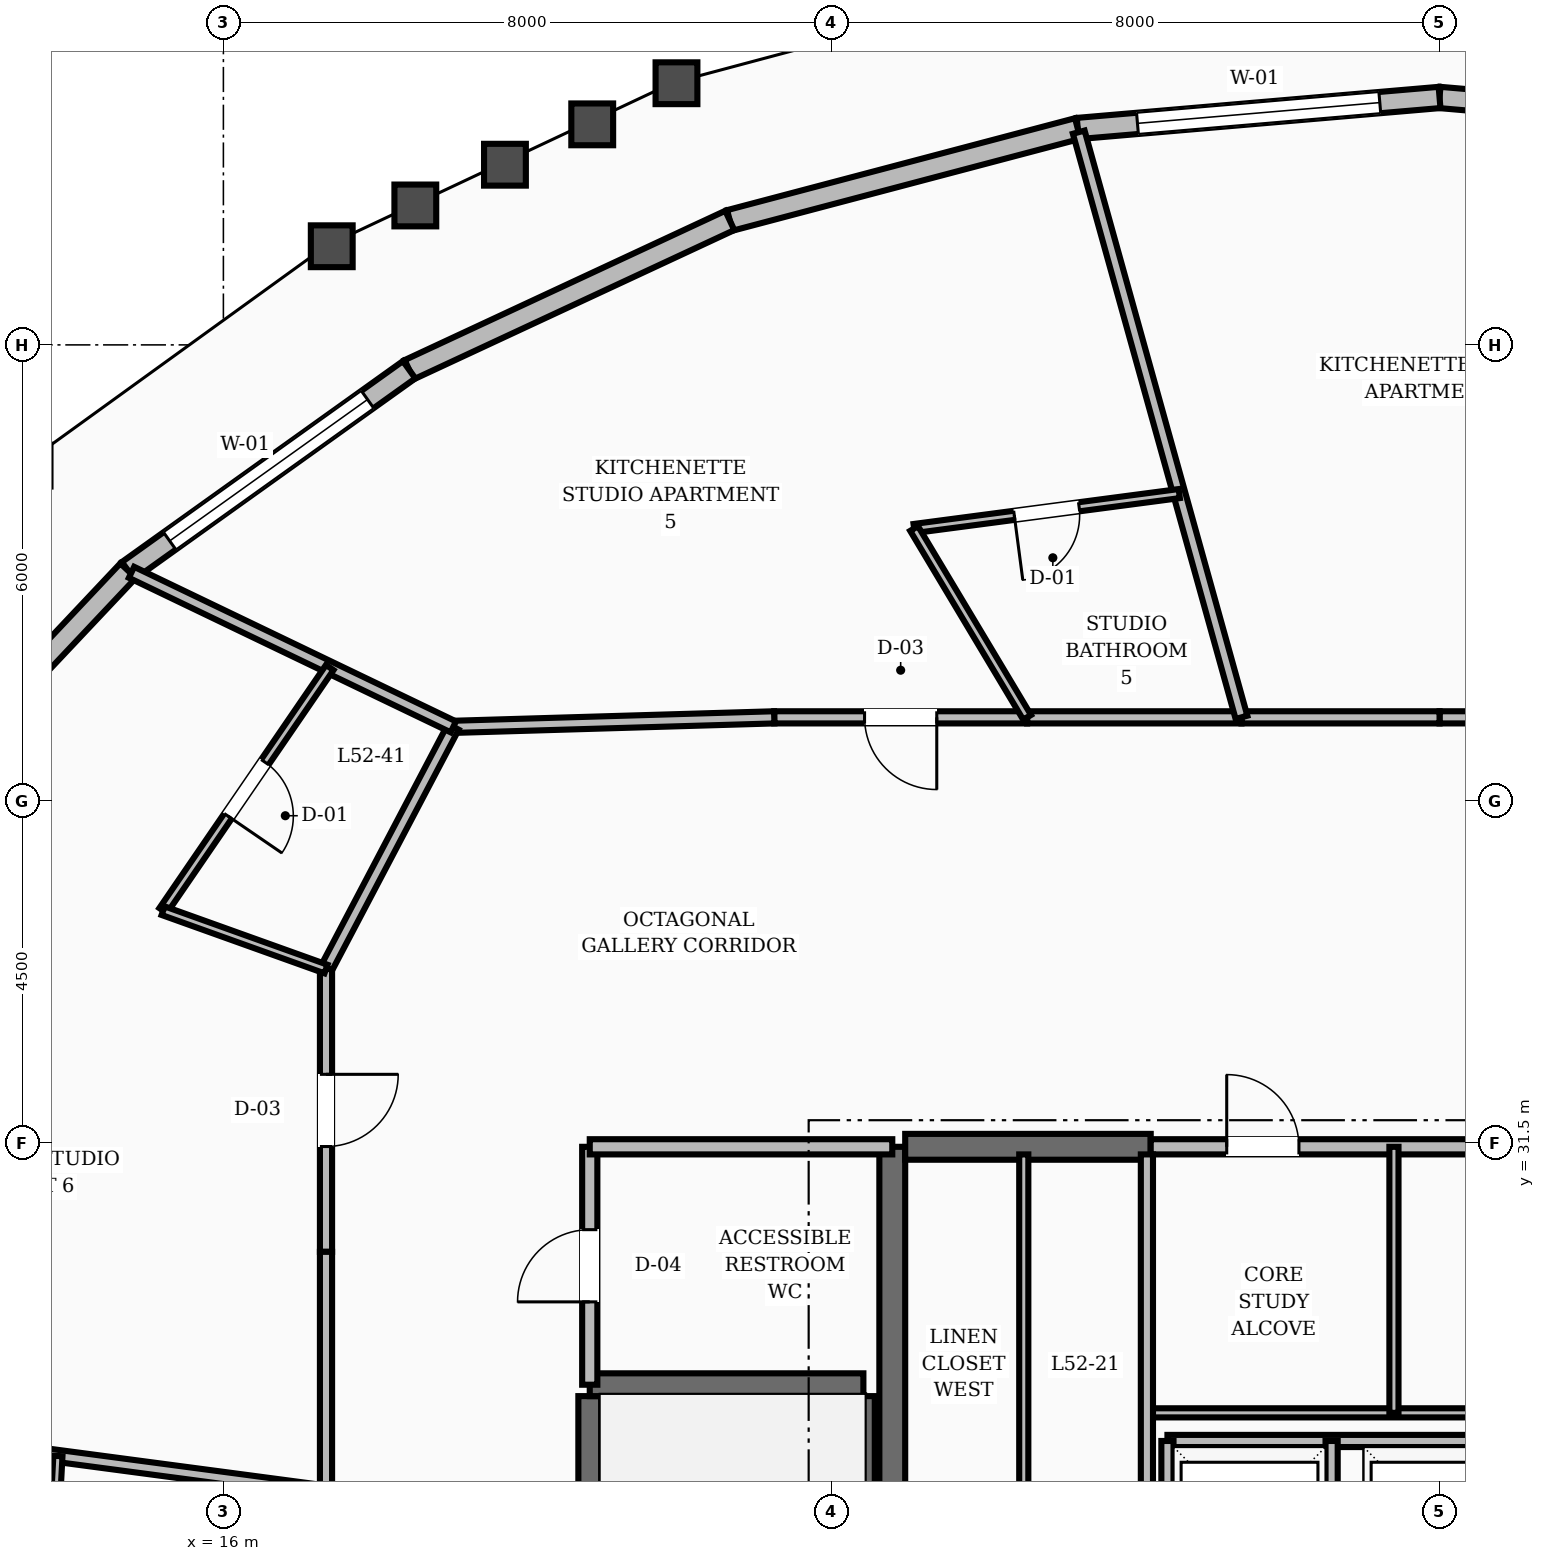
"""IFC4 building model, lengths in metres.
Left out: names, types, materials, properties, quantities, classifications, styles, units other than length and angle.
Written with IfcOpenShell. Run it as: python <this file> out.ifc"""

import sys

from ifc_helpers import new_model, si_unit, direction, frame, frame_2d, origin, place, context, subcontext, project, spatial, rectangle, extrude, element, fill, save


model = new_model("IFC4")
c1 = context("Model", 3, precision=1e-05, world=origin(), true_north=direction((0.0, 1.0)))
c2 = subcontext(c1, "Body", "Model", "MODEL_VIEW")
j1 = project(units=[si_unit("LENGTHUNIT", "METRE"), si_unit("PLANEANGLEUNIT", "RADIAN")], contexts=[c1])
p1 = place(None, origin())
s1 = spatial("IfcSite", under=j1, at=p1, CompositionType="ELEMENT")
p2 = place(p1, origin())
s2 = spatial("IfcBuilding", under=s1, at=p2, CompositionType="ELEMENT")
p3 = place(p2, frame((0.0, 0.0, 200.0)))
s3 = spatial("IfcBuildingStorey", under=s2, at=p3, CompositionType="ELEMENT", Elevation=200.0)
p4 = place(p3, frame((24.8, 25.15, 0.0), z_axis=(0.0, 0.0, 1.0), x_axis=(0.0, 1.0, 0.0)))
e1 = element("IfcWall", 1, at=p4, inside=s3, PredefinedType="SHEAR", context=c2, shape_type="SweptSolid", body=[
    extrude(rectangle(XDim=6.3, YDim=0.34, at=frame_2d((3.15, 0.0))), origin(), (0.0, 0.0, 1.0), 3.6),
])
p5 = place(p3, frame((24.97, 31.45, 0.0), z_axis=(0.0, 0.0, 1.0), x_axis=(1.0, 0.0, 0.0)))
e2 = element("IfcWall", 2, at=p5, inside=s3, PredefinedType="SHEAR", context=c2, shape_type="SweptSolid", body=[
    extrude(rectangle(XDim=3.23, YDim=0.34, at=frame_2d((1.615, 0.0))), origin(), (0.0, 0.0, 1.0), 3.6),
])
for number, where, z_axis, x_axis in (
    (3, (20.82, 19.43, 0.0), (0.0, 0.0, 1.0), (0.0, 1.0, 0.0)),
    (4, (24.42, 19.43, 0.0), (0.0, 0.0, 1.0), (0.0, 1.0, 0.0)),
):
    element("IfcWall", number, at=place(p3, frame(where, z_axis=z_axis, x_axis=x_axis)), inside=s3, PredefinedType="SHEAR", context=c2, shape_type="SweptSolid", body=[
        extrude(rectangle(XDim=8.74, YDim=0.3, at=frame_2d((4.37, 0.0))), origin(), (0.0, 0.0, 1.0), 3.6),
    ])
p6 = place(p3, frame((20.82, 28.32, 0.0), z_axis=(0.0, 0.0, 1.0), x_axis=(1.0, 0.0, 0.0)))
e5 = element("IfcWall", 5, at=p6, inside=s3, PredefinedType="SHEAR", context=c2, shape_type="SweptSolid", body=[
    extrude(rectangle(XDim=3.6, YDim=0.3, at=frame_2d((1.8, 0.0))), origin(), (0.0, 0.0, 1.0), 3.6),
])
p7 = place(p3, frame((36.76, 44.847, 0.0), z_axis=(0.0, 0.0, 1.0), x_axis=(-0.996339067147, 0.085489550689, 0.0)))
e6 = element("IfcWall", 6, at=p7, inside=s3, PredefinedType="STANDARD", context=c2, shape_type="SweptSolid", body=[
    extrude(rectangle(XDim=4.778, YDim=0.28, at=frame_2d((2.389, 0.0))), origin(), (0.0, 0.0, 1.0), 2.77),
])
p8 = place(p3, frame((32.0, 45.255, 0.0), z_axis=(0.0, 0.0, 1.0), x_axis=(-0.996339067147, -0.085489550689, 0.0)))
e7 = element("IfcWall", 7, at=p8, inside=s3, PredefinedType="STANDARD", context=c2, shape_type="SweptSolid", body=[
    extrude(rectangle(XDim=4.778, YDim=0.28, at=frame_2d((2.389, 0.0))), origin(), (0.0, 0.0, 1.0), 2.77),
])
p9 = place(p8, frame((0.789, 0.0, 0.8)))
e8 = element("IfcOpeningElement", 8, at=p9, cuts=e7, PredefinedType="OPENING", context=c2, shape_type="SweptSolid", body=[
    extrude(rectangle(XDim=3.2, YDim=1.65, at=frame_2d((1.6, 0.825))), frame((0.0, 0.15, 0.0), z_axis=(0.0, -1.0, 0.0), x_axis=(1.0, 0.0, 0.0)), (0.0, 0.0, 1.0), 0.3),
])
p10 = place(p3, frame((27.24, 44.847, 0.0), z_axis=(0.0, 0.0, 1.0), x_axis=(-0.966819561224, -0.255460243549, 0.0)))
e9 = element("IfcWall", 9, at=p10, inside=s3, PredefinedType="STANDARD", context=c2, shape_type="SweptSolid", body=[
    extrude(rectangle(XDim=4.734, YDim=0.28, at=frame_2d((2.367, 0.0))), origin(), (0.0, 0.0, 1.0), 2.77),
])
p11 = place(p3, frame((22.662, 43.637, 0.0), z_axis=(0.0, 0.0, 1.0), x_axis=(-0.906555409807, -0.422086826315, 0.0)))
e10 = element("IfcWall", 10, at=p11, inside=s3, PredefinedType="STANDARD", context=c2, shape_type="SweptSolid", body=[
    extrude(rectangle(XDim=4.653, YDim=0.28, at=frame_2d((2.327, 0.0))), origin(), (0.0, 0.0, 1.0), 2.77),
])
p12 = place(p3, frame((18.444, 41.673, 0.0), z_axis=(0.0, 0.0, 1.0), x_axis=(-0.813519294528, -0.581537924327, 0.0)))
e11 = element("IfcWall", 11, at=p12, inside=s3, PredefinedType="STANDARD", context=c2, shape_type="SweptSolid", body=[
    extrude(rectangle(XDim=4.545, YDim=0.28, at=frame_2d((2.273, 0.0))), origin(), (0.0, 0.0, 1.0), 2.77),
])
p13 = place(p12, frame((0.673, 0.0, 0.8)))
e12 = element("IfcOpeningElement", 12, at=p13, cuts=e11, PredefinedType="OPENING", context=c2, shape_type="SweptSolid", body=[
    extrude(rectangle(XDim=3.2, YDim=1.65, at=frame_2d((1.6, 0.825))), frame((0.0, 0.15, 0.0), z_axis=(0.0, -1.0, 0.0), x_axis=(1.0, 0.0, 0.0)), (0.0, 0.0, 1.0), 0.3),
])
p14 = place(p3, frame((14.746, 39.03, 0.0), z_axis=(0.0, 0.0, 1.0), x_axis=(-0.685717407763, -0.727867870352, 0.0)))
e13 = element("IfcWall", 13, at=p14, inside=s3, PredefinedType="STANDARD", context=c2, shape_type="SweptSolid", body=[
    extrude(rectangle(XDim=4.425, YDim=0.28, at=frame_2d((2.213, 0.0))), origin(), (0.0, 0.0, 1.0), 2.77),
])
p15 = place(p3, frame((20.82, 28.32, 0.0), z_axis=(0.0, 0.0, 1.0), x_axis=(0.0, 1.0, 0.0)))
e14 = element("IfcWall", 14, at=p15, inside=s3, PredefinedType="SOLIDWALL", context=c2, shape_type="SweptSolid", body=[
    extrude(rectangle(XDim=3.13, YDim=0.2, at=frame_2d((1.565, 0.0))), origin(), (0.0, 0.0, 1.0), 2.75),
])
p16 = place(p15, frame((1.09, 0.0, 0.0)))
e15 = element("IfcOpeningElement", 15, at=p16, cuts=e14, PredefinedType="OPENING", context=c2, shape_type="SweptSolid", body=[
    extrude(rectangle(XDim=0.95, YDim=2.1, at=frame_2d((0.475, 1.05))), frame((0.0, 0.11, 0.0), z_axis=(0.0, -1.0, 0.0), x_axis=(1.0, 0.0, 0.0)), (0.0, 0.0, 1.0), 0.22),
])
p17 = place(p3, frame((20.82, 31.45, 0.0), z_axis=(0.0, 0.0, 1.0), x_axis=(1.0, 0.0, 0.0)))
e16 = element("IfcWall", 16, at=p17, inside=s3, PredefinedType="SOLIDWALL", context=c2, shape_type="SweptSolid", body=[
    extrude(rectangle(XDim=3.98, YDim=0.2, at=frame_2d((1.99, 0.0))), origin(), (0.0, 0.0, 1.0), 2.75),
])
p18 = place(p3, frame((28.42, 27.58, 0.0), z_axis=(0.0, 0.0, 1.0), x_axis=(1.0, 0.0, 0.0)))
e17 = element("IfcWall", 17, at=p18, inside=s3, PredefinedType="SOLIDWALL", context=c2, shape_type="SweptSolid", body=[
    extrude(rectangle(XDim=4.66, YDim=0.16, at=frame_2d((2.33, 0.0))), origin(), (0.0, 0.0, 1.0), 2.75),
])
for number, where, z_axis, x_axis in (
    (18, (28.42, 25.42, 0.0), (0.0, 0.0, 1.0), (0.0, 1.0, 0.0)),
    (19, (30.58, 25.42, 0.0), (0.0, 0.0, 1.0), (0.0, 1.0, 0.0)),
):
    element("IfcWall", number, at=place(p3, frame(where, z_axis=z_axis, x_axis=x_axis)), inside=s3, PredefinedType="SOLIDWALL", context=c2, shape_type="SweptSolid", body=[
        extrude(rectangle(XDim=2.16, YDim=0.16, at=frame_2d((1.08, 0.0))), origin(), (0.0, 0.0, 1.0), 2.75),
    ])
p19 = place(p3, frame((28.2, 31.45, 0.0), z_axis=(0.0, 0.0, 1.0), x_axis=(1.0, 0.0, 0.0)))
e20 = element("IfcWall", 20, at=p19, inside=s3, PredefinedType="SOLIDWALL", context=c2, shape_type="SweptSolid", body=[
    extrude(rectangle(XDim=7.6, YDim=0.2, at=frame_2d((3.8, 0.0))), origin(), (0.0, 0.0, 1.0), 2.75),
])
p20 = place(p19, frame((1.0, 0.0, 0.0)))
e21 = element("IfcOpeningElement", 21, at=p20, cuts=e20, PredefinedType="OPENING", context=c2, shape_type="SweptSolid", body=[
    extrude(rectangle(XDim=0.95, YDim=2.1, at=frame_2d((0.475, 1.05))), frame((0.0, 0.11, 0.0), z_axis=(0.0, -1.0, 0.0), x_axis=(1.0, 0.0, 0.0)), (0.0, 0.0, 1.0), 0.22),
])
p21 = place(p3, frame((28.2, 27.95, 0.0), z_axis=(0.0, 0.0, 1.0), x_axis=(1.0, 0.0, 0.0)))
e22 = element("IfcWall", 22, at=p21, inside=s3, PredefinedType="PARTITIONING", context=c2, shape_type="SweptSolid", body=[
    extrude(rectangle(XDim=7.6, YDim=0.12, at=frame_2d((3.8, 0.0))), origin(), (0.0, 0.0, 1.0), 2.75),
])
p22 = place(p3, frame((31.4, 27.95, 0.0), z_axis=(0.0, 0.0, 1.0), x_axis=(0.0, 1.0, 0.0)))
e23 = element("IfcWall", 23, at=p22, inside=s3, PredefinedType="PARTITIONING", context=c2, shape_type="SweptSolid", body=[
    extrude(rectangle(XDim=3.5, YDim=0.12, at=frame_2d((1.75, 0.0))), origin(), (0.0, 0.0, 1.0), 2.75),
])
p23 = place(p3, frame((28.15, 25.25, 0.0), z_axis=(0.0, 0.0, 1.0), x_axis=(0.0, 1.0, 0.0)))
e24 = element("IfcWall", 24, at=p23, inside=s3, PredefinedType="SOLIDWALL", context=c2, shape_type="SweptSolid", body=[
    extrude(rectangle(XDim=6.1, YDim=0.16, at=frame_2d((3.05, 0.0))), origin(), (0.0, 0.0, 1.0), 2.75),
])
p24 = place(p3, frame((26.53, 25.25, 0.0), z_axis=(0.0, 0.0, 1.0), x_axis=(0.0, 1.0, 0.0)))
e25 = element("IfcWall", 25, at=p24, inside=s3, PredefinedType="PARTITIONING", context=c2, shape_type="SweptSolid", body=[
    extrude(rectangle(XDim=6.1, YDim=0.12, at=frame_2d((3.05, 0.0))), origin(), (0.0, 0.0, 1.0), 2.75),
])
p25 = place(p3, frame((34.606, 37.1, 0.0), z_axis=(0.0, 0.0, 1.0), x_axis=(-1.0, 0.0, 0.0)))
e26 = element("IfcWall", 26, at=p25, inside=s3, PredefinedType="SOLIDWALL", context=c2, shape_type="SweptSolid", body=[
    extrude(rectangle(XDim=2.606, YDim=0.16, at=frame_2d((1.303, 0.0))), origin(), (0.0, 0.0, 1.0), 2.75),
])
p26 = place(p25, frame((0.828, 0.0, 0.0)))
e27 = element("IfcOpeningElement", 27, at=p26, cuts=e26, PredefinedType="OPENING", context=c2, shape_type="SweptSolid", body=[
    extrude(rectangle(XDim=0.95, YDim=2.1, at=frame_2d((0.475, 1.05))), frame((0.0, 0.09, 0.0), z_axis=(0.0, -1.0, 0.0), x_axis=(1.0, 0.0, 0.0)), (0.0, 0.0, 1.0), 0.18),
])
p27 = place(p3, frame((32.0, 37.1, 0.0), z_axis=(0.0, 0.0, 1.0), x_axis=(-1.0, 0.0, 0.0)))
e28 = element("IfcWall", 28, at=p27, inside=s3, PredefinedType="SOLIDWALL", context=c2, shape_type="SweptSolid", body=[
    extrude(rectangle(XDim=2.606, YDim=0.16, at=frame_2d((1.303, 0.0))), origin(), (0.0, 0.0, 1.0), 2.75),
])
p28 = place(p3, frame((29.394, 37.1, 0.0), z_axis=(0.0, 0.0, 1.0), x_axis=(-1.0, 0.0, 0.0)))
e29 = element("IfcWall", 29, at=p28, inside=s3, PredefinedType="SOLIDWALL", context=c2, shape_type="SweptSolid", body=[
    extrude(rectangle(XDim=2.821, YDim=0.16, at=frame_2d((1.41, 0.0))), origin(), (0.0, 0.0, 1.0), 2.75),
])
p29 = place(p3, frame((26.574, 37.1, 0.0), z_axis=(0.0, 0.0, 1.0), x_axis=(-1.0, 0.0, 0.0)))
e30 = element("IfcWall", 30, at=p29, inside=s3, PredefinedType="SOLIDWALL", context=c2, shape_type="SweptSolid", body=[
    extrude(rectangle(XDim=3.327, YDim=0.16, at=frame_2d((1.664, 0.0))), origin(), (0.0, 0.0, 1.0), 2.75),
])
p30 = place(p29, frame((1.188, 0.0, 0.0)))
e31 = element("IfcOpeningElement", 31, at=p30, cuts=e30, PredefinedType="OPENING", context=c2, shape_type="SweptSolid", body=[
    extrude(rectangle(XDim=0.95, YDim=2.1, at=frame_2d((0.475, 1.05))), frame((0.0, 0.09, 0.0), z_axis=(0.0, -1.0, 0.0), x_axis=(1.0, 0.0, 0.0)), (0.0, 0.0, 1.0), 0.18),
])
p31 = place(p3, frame((23.247, 37.1, 0.0), z_axis=(0.0, 0.0, 1.0), x_axis=(-0.999561990195, -0.029594387265, 0.0)))
e32 = element("IfcWall", 32, at=p31, inside=s3, PredefinedType="SOLIDWALL", context=c2, shape_type="SweptSolid", body=[
    extrude(rectangle(XDim=4.224, YDim=0.16, at=frame_2d((2.112, 0.0))), origin(), (0.0, 0.0, 1.0), 2.75),
])
p32 = place(p3, frame((19.025, 36.975, 0.0), z_axis=(0.0, 0.0, 1.0), x_axis=(-0.46527115782, -0.885168204185, 0.0)))
e33 = element("IfcWall", 33, at=p32, inside=s3, PredefinedType="SOLIDWALL", context=c2, shape_type="SweptSolid", body=[
    extrude(rectangle(XDim=3.6, YDim=0.16, at=frame_2d((1.8, 0.0))), origin(), (0.0, 0.0, 1.0), 2.75),
])
p33 = place(p3, frame((17.35, 33.789, 0.0), z_axis=(0.0, 0.0, 1.0), x_axis=(0.0, -1.0, 0.0)))
e34 = element("IfcWall", 34, at=p33, inside=s3, PredefinedType="SOLIDWALL", context=c2, shape_type="SweptSolid", body=[
    extrude(rectangle(XDim=3.721, YDim=0.16, at=frame_2d((1.86, 0.0))), origin(), (0.0, 0.0, 1.0), 2.75),
])
p34 = place(p33, frame((1.385, 0.0, 0.0)))
e35 = element("IfcOpeningElement", 35, at=p34, cuts=e34, PredefinedType="OPENING", context=c2, shape_type="SweptSolid", body=[
    extrude(rectangle(XDim=0.95, YDim=2.1, at=frame_2d((0.475, 1.05))), frame((0.0, 0.09, 0.0), z_axis=(0.0, -1.0, 0.0), x_axis=(1.0, 0.0, 0.0)), (0.0, 0.0, 1.0), 0.18),
])
p35 = place(p3, frame((17.35, 30.068, 0.0), z_axis=(0.0, 0.0, 1.0), x_axis=(0.0, -1.0, 0.0)))
e36 = element("IfcWall", 36, at=p35, inside=s3, PredefinedType="SOLIDWALL", context=c2, shape_type="SweptSolid", body=[
    extrude(rectangle(XDim=3.154, YDim=0.16, at=frame_2d((1.577, 0.0))), origin(), (0.0, 0.0, 1.0), 2.75),
])
p36 = place(p3, frame((29.394, 37.1, 0.0), z_axis=(0.0, 0.0, 1.0), x_axis=(-0.26795113258, 0.963432504408, 0.0)))
e37 = element("IfcWall", 37, at=p36, inside=s3, PredefinedType="SOLIDWALL", context=c2, shape_type="SweptSolid", body=[
    extrude(rectangle(XDim=7.991, YDim=0.16, at=frame_2d((3.995, 0.0))), origin(), (0.0, 0.0, 1.0), 2.75),
])
p37 = place(p3, frame((28.575, 40.044, 0.0), z_axis=(0.0, 0.0, 1.0), x_axis=(-0.99142616553, -0.130668122747, 0.0)))
e38 = element("IfcWall", 38, at=p37, inside=s3, PredefinedType="PARTITIONING", context=c2, shape_type="SweptSolid", body=[
    extrude(rectangle(XDim=3.518, YDim=0.12, at=frame_2d((1.759, 0.0))), origin(), (0.0, 0.0, 1.0), 2.75),
])
p38 = place(p37, frame((1.329, 0.0, 0.0)))
e39 = element("IfcOpeningElement", 39, at=p38, cuts=e38, PredefinedType="OPENING", context=c2, shape_type="SweptSolid", body=[
    extrude(rectangle(XDim=0.86, YDim=2.1, at=frame_2d((0.43, 1.05))), frame((0.0, 0.07, 0.0), z_axis=(0.0, -1.0, 0.0), x_axis=(1.0, 0.0, 0.0)), (0.0, 0.0, 1.0), 0.14),
])
p39 = place(p3, frame((26.574, 37.1, 0.0), z_axis=(0.0, 0.0, 1.0), x_axis=(-0.513478319861, 0.858102566732, 0.0)))
e40 = element("IfcWall", 40, at=p39, inside=s3, PredefinedType="PARTITIONING", context=c2, shape_type="SweptSolid", body=[
    extrude(rectangle(XDim=2.895, YDim=0.12, at=frame_2d((1.447, 0.0))), origin(), (0.0, 0.0, 1.0), 2.75),
])
p40 = place(p3, frame((19.025, 36.975, 0.0), z_axis=(0.0, 0.0, 1.0), x_axis=(-0.901455717386, 0.43287133145, 0.0)))
e41 = element("IfcWall", 41, at=p40, inside=s3, PredefinedType="SOLIDWALL", context=c2, shape_type="SweptSolid", body=[
    extrude(rectangle(XDim=4.697, YDim=0.16, at=frame_2d((2.348, 0.0))), origin(), (0.0, 0.0, 1.0), 2.75),
])
p41 = place(p3, frame((17.399, 37.756, 0.0), z_axis=(0.0, 0.0, 1.0), x_axis=(-0.56513068161, -0.825001401637, 0.0)))
e42 = element("IfcWall", 42, at=p41, inside=s3, PredefinedType="PARTITIONING", context=c2, shape_type="SweptSolid", body=[
    extrude(rectangle(XDim=3.878, YDim=0.12, at=frame_2d((1.939, 0.0))), origin(), (0.0, 0.0, 1.0), 2.75),
])
p42 = place(p41, frame((1.509, 0.0, 0.0)))
e43 = element("IfcOpeningElement", 43, at=p42, cuts=e42, PredefinedType="OPENING", context=c2, shape_type="SweptSolid", body=[
    extrude(rectangle(XDim=0.86, YDim=2.1, at=frame_2d((0.43, 1.05))), frame((0.0, 0.07, 0.0), z_axis=(0.0, -1.0, 0.0), x_axis=(1.0, 0.0, 0.0)), (0.0, 0.0, 1.0), 0.14),
])
p43 = place(p3, frame((17.35, 33.789, 0.0), z_axis=(0.0, 0.0, 1.0), x_axis=(-0.94141139312, 0.337260417043, 0.0)))
e44 = element("IfcWall", 44, at=p43, inside=s3, PredefinedType="PARTITIONING", context=c2, shape_type="SweptSolid", body=[
    extrude(rectangle(XDim=2.276, YDim=0.12, at=frame_2d((1.138, 0.0))), origin(), (0.0, 0.0, 1.0), 2.75),
])
p44 = place(p3, frame((17.35, 26.914, 0.0), z_axis=(0.0, 0.0, 1.0), x_axis=(-0.991296450771, 0.131648572677, 0.0)))
e45 = element("IfcWall", 45, at=p44, inside=s3, PredefinedType="SOLIDWALL", context=c2, shape_type="SweptSolid", body=[
    extrude(rectangle(XDim=9.313, YDim=0.16, at=frame_2d((4.657, 0.0))), origin(), (0.0, 0.0, 1.0), 2.75),
])
p45 = place(p3, frame((13.823, 27.383, 0.0), z_axis=(0.0, 0.0, 1.0), x_axis=(-0.052615578061, -0.99861484114, 0.0)))
e46 = element("IfcWall", 46, at=p45, inside=s3, PredefinedType="PARTITIONING", context=c2, shape_type="SweptSolid", body=[
    extrude(rectangle(XDim=3.387, YDim=0.12, at=frame_2d((1.694, 0.0))), origin(), (0.0, 0.0, 1.0), 2.75),
])
p46 = place(p45, frame((1.264, 0.0, 0.0)))
e47 = element("IfcOpeningElement", 47, at=p46, cuts=e46, PredefinedType="OPENING", context=c2, shape_type="SweptSolid", body=[
    extrude(rectangle(XDim=0.86, YDim=2.1, at=frame_2d((0.43, 1.05))), frame((0.0, 0.07, 0.0), z_axis=(0.0, -1.0, 0.0), x_axis=(1.0, 0.0, 0.0)), (0.0, 0.0, 1.0), 0.14),
])
p47 = place(p9, origin())
e48 = element("IfcWindow", 48, at=p47, inside=s3, PartitioningType="SINGLE_PANEL", PredefinedType="WINDOW", context=c2, shape_type="SweptSolid", body=[
    extrude(rectangle(XDim=3.2, YDim=1.65, at=frame_2d((1.6, 0.825))), frame((0.0, 0.03, 0.0), z_axis=(0.0, -1.0, 0.0), x_axis=(1.0, 0.0, 0.0)), (0.0, 0.0, 1.0), 0.06),
])
fill(e8, e48)
p48 = place(p13, origin())
e49 = element("IfcWindow", 49, at=p48, inside=s3, PartitioningType="SINGLE_PANEL", PredefinedType="WINDOW", context=c2, shape_type="SweptSolid", body=[
    extrude(rectangle(XDim=3.2, YDim=1.65, at=frame_2d((1.6, 0.825))), frame((0.0, 0.03, 0.0), z_axis=(0.0, -1.0, 0.0), x_axis=(1.0, 0.0, 0.0)), (0.0, 0.0, 1.0), 0.06),
])
fill(e12, e49)
p49 = place(p16, origin())
e50 = element("IfcDoor", 50, at=p49, inside=s3, OperationType="SINGLE_SWING_LEFT", PredefinedType="DOOR", context=c2, shape_type="SweptSolid", body=[
    extrude(rectangle(XDim=0.95, YDim=2.1, at=frame_2d((0.475, 1.05))), frame((0.0, 0.025, 0.0), z_axis=(0.0, -1.0, 0.0), x_axis=(1.0, 0.0, 0.0)), (0.0, 0.0, 1.0), 0.05),
])
fill(e15, e50)
p50 = place(p20, origin())
e51 = element("IfcDoor", 51, at=p50, inside=s3, OperationType="SINGLE_SWING_LEFT", PredefinedType="DOOR", context=c2, shape_type="SweptSolid", body=[
    extrude(rectangle(XDim=0.95, YDim=2.1, at=frame_2d((0.475, 1.05))), frame((0.0, 0.025, 0.0), z_axis=(0.0, -1.0, 0.0), x_axis=(1.0, 0.0, 0.0)), (0.0, 0.0, 1.0), 0.05),
])
fill(e21, e51)
p51 = place(p38, origin())
e52 = element("IfcDoor", 52, at=p51, inside=s3, OperationType="SINGLE_SWING_RIGHT", PredefinedType="DOOR", context=c2, shape_type="SweptSolid", body=[
    extrude(rectangle(XDim=0.86, YDim=2.1, at=frame_2d((0.43, 1.05))), frame((0.0, 0.025, 0.0), z_axis=(0.0, -1.0, 0.0), x_axis=(1.0, 0.0, 0.0)), (0.0, 0.0, 1.0), 0.05),
])
fill(e39, e52)
p52 = place(p30, origin())
e53 = element("IfcDoor", 53, at=p52, inside=s3, OperationType="SINGLE_SWING_LEFT", PredefinedType="DOOR", context=c2, shape_type="SweptSolid", body=[
    extrude(rectangle(XDim=0.95, YDim=2.1, at=frame_2d((0.475, 1.05))), frame((0.0, 0.025, 0.0), z_axis=(0.0, -1.0, 0.0), x_axis=(1.0, 0.0, 0.0)), (0.0, 0.0, 1.0), 0.05),
])
fill(e31, e53)
p53 = place(p42, origin())
e54 = element("IfcDoor", 54, at=p53, inside=s3, OperationType="SINGLE_SWING_RIGHT", PredefinedType="DOOR", context=c2, shape_type="SweptSolid", body=[
    extrude(rectangle(XDim=0.86, YDim=2.1, at=frame_2d((0.43, 1.05))), frame((0.0, 0.025, 0.0), z_axis=(0.0, -1.0, 0.0), x_axis=(1.0, 0.0, 0.0)), (0.0, 0.0, 1.0), 0.05),
])
fill(e43, e54)
p54 = place(p34, origin())
e55 = element("IfcDoor", 55, at=p54, inside=s3, OperationType="SINGLE_SWING_LEFT", PredefinedType="DOOR", context=c2, shape_type="SweptSolid", body=[
    extrude(rectangle(XDim=0.95, YDim=2.1, at=frame_2d((0.475, 1.05))), frame((0.0, 0.025, 0.0), z_axis=(0.0, -1.0, 0.0), x_axis=(1.0, 0.0, 0.0)), (0.0, 0.0, 1.0), 0.05),
])
fill(e35, e55)
save(model, sys.argv[1])
